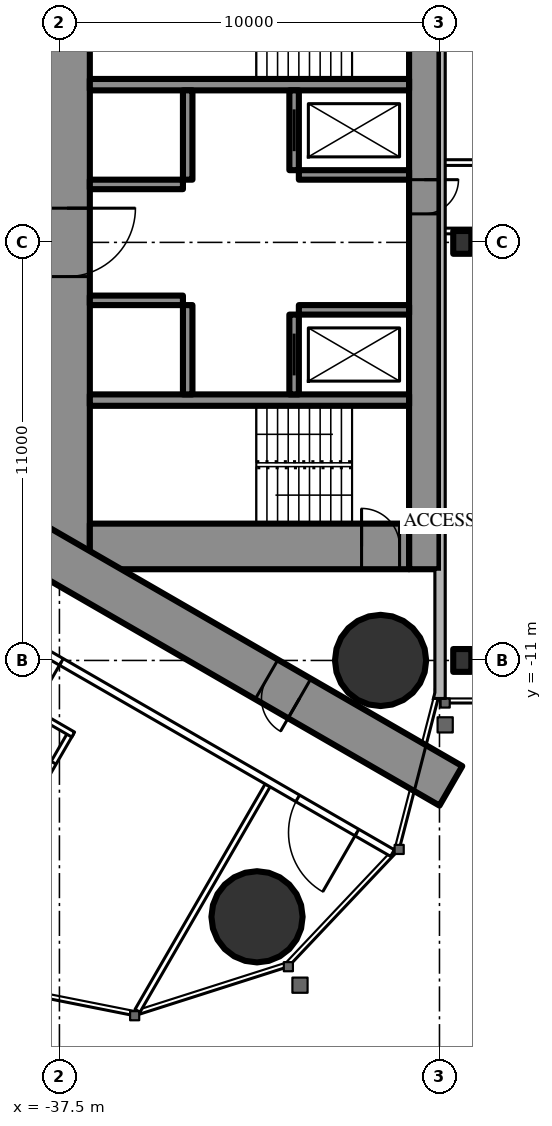
"""IFC4 building model, lengths in metres.
Left out: names, types, materials, properties, quantities, classifications, styles, units other than length and angle.
Written with IfcOpenShell. Run it as: python <this file> out.ifc"""

import sys

from ifc_helpers import new_model, si_unit, direction, frame, frame_2d, origin, origin_2d, place, context, subcontext, project, spatial, rectangle, circle, i_section, extrude, element, fill, save


model = new_model("IFC4")
c1 = context("Model", 3, precision=1e-05, world=origin(), true_north=direction((0.0, 1.0)))
c2 = subcontext(c1, "Body", "Model", "MODEL_VIEW")
j1 = project(units=[si_unit("LENGTHUNIT", "METRE"), si_unit("PLANEANGLEUNIT", "RADIAN")], contexts=[c1])
p1 = place(None, origin())
s1 = spatial("IfcSite", under=j1, at=p1, CompositionType="ELEMENT")
p2 = place(p1, origin())
s2 = spatial("IfcBuilding", under=s1, at=p2, CompositionType="ELEMENT")
p3 = place(p2, frame((0.0, 0.0, 229.7)))
s3 = spatial("IfcBuildingStorey", under=s2, at=p3, CompositionType="ELEMENT", Elevation=229.7)
for number, where, z_axis, x_axis in (
    (1, (-32.301, -17.745, 0.0), (0.0, 0.0, 1.0), (1.0, 0.0, 0.0)),
    (2, (-29.05, -11.0, 0.0), (0.0, 0.0, 1.0), (1.0, 0.0, 0.0)),
):
    element("IfcColumn", number, at=place(p3, frame(where, z_axis=z_axis, x_axis=x_axis)), inside=s3, PredefinedType="COLUMN", context=c2, shape_type="SweptSolid", body=[
        extrude(circle(Radius=1.2, at=origin_2d()), origin(), (0.0, 0.0, 1.0), 3.6),
    ])
p4 = place(p3, frame((-27.9, 8.6, 0.0), z_axis=(0.0, 0.0, 1.0), x_axis=(0.0, -1.0, 0.0)))
e3 = element("IfcWall", 3, at=p4, inside=s3, PredefinedType="SHEAR", context=c2, shape_type="SweptSolid", body=[
    extrude(rectangle(XDim=17.2, YDim=0.8, at=frame_2d((8.6, 0.0))), origin(), (0.0, 0.0, 1.0), 3.6),
])
p5 = place(p4, frame((6.95, 0.0, 0.0)))
e4 = element("IfcOpeningElement", 4, at=p5, cuts=e3, PredefinedType="OPENING", context=c2, shape_type="SweptSolid", body=[
    extrude(rectangle(XDim=0.9, YDim=2.2, at=frame_2d((0.45, 1.1))), frame((0.0, 0.41, 0.0), z_axis=(0.0, -1.0, 0.0), x_axis=(1.0, 0.0, 0.0)), (0.0, 0.0, 1.0), 0.82),
])
p6 = place(p3, frame((-37.3, 8.6, 0.0), z_axis=(0.0, 0.0, 1.0), x_axis=(0.0, -1.0, 0.0)))
e5 = element("IfcWall", 5, at=p6, inside=s3, PredefinedType="SHEAR", context=c2, shape_type="SweptSolid", body=[
    extrude(rectangle(XDim=17.2, YDim=1.2, at=frame_2d((8.6, 0.0))), origin(), (0.0, 0.0, 1.0), 3.6),
])
p7 = place(p6, frame((7.7, 0.0, 0.0)))
e6 = element("IfcOpeningElement", 6, at=p7, cuts=e5, PredefinedType="OPENING", context=c2, shape_type="SweptSolid", body=[
    extrude(rectangle(XDim=1.8, YDim=2.2, at=frame_2d((0.9, 1.1))), frame((0.0, 0.61, 0.0), z_axis=(0.0, -1.0, 0.0), x_axis=(1.0, 0.0, 0.0)), (0.0, 0.0, 1.0), 1.22),
])
p8 = place(p3, frame((-28.3, -8.0, 0.0), z_axis=(0.0, 0.0, 1.0), x_axis=(-1.0, 0.0, 0.0)))
e7 = element("IfcWall", 7, at=p8, inside=s3, PredefinedType="SHEAR", context=c2, shape_type="SweptSolid", body=[
    extrude(rectangle(XDim=8.4, YDim=1.2, at=frame_2d((4.2, 0.0))), origin(), (0.0, 0.0, 1.0), 3.6),
])
p9 = place(p8, frame((0.25, 0.0, 0.0)))
e8 = element("IfcOpeningElement", 8, at=p9, cuts=e7, PredefinedType="OPENING", context=c2, shape_type="SweptSolid", body=[
    extrude(rectangle(XDim=1.0, YDim=2.2, at=frame_2d((0.5, 1.1))), frame((0.0, 0.61, 0.0), z_axis=(0.0, -1.0, 0.0), x_axis=(1.0, 0.0, 0.0)), (0.0, 0.0, 1.0), 1.22),
])
for number, where, z_axis, x_axis in (
    (9, (-28.3, 4.15, 0.0), (0.0, 0.0, 1.0), (-1.0, 0.0, 0.0)),
    (10, (-28.3, -4.15, 0.0), (0.0, 0.0, 1.0), (-1.0, 0.0, 0.0)),
):
    element("IfcWall", number, at=place(p3, frame(where, z_axis=z_axis, x_axis=x_axis)), inside=s3, PredefinedType="SHEAR", context=c2, shape_type="SweptSolid", body=[
        extrude(rectangle(XDim=8.4, YDim=0.3, at=frame_2d((4.2, 0.0))), origin(), (0.0, 0.0, 1.0), 3.6),
    ])
p10 = place(p3, frame((-31.325, 4.0, 0.0), z_axis=(0.0, 0.0, 1.0), x_axis=(0.0, -1.0, 0.0)))
e11 = element("IfcWall", 11, at=p10, inside=s3, PredefinedType="SHEAR", context=c2, shape_type="SweptSolid", body=[
    extrude(rectangle(XDim=2.1, YDim=0.25, at=frame_2d((1.05, 0.0))), origin(), (0.0, 0.0, 1.0), 3.6),
])
p11 = place(p10, frame((0.5, 0.0, 0.0)))
e12 = element("IfcOpeningElement", 12, at=p11, cuts=e11, PredefinedType="OPENING", context=c2, shape_type="SweptSolid", body=[
    extrude(rectangle(XDim=1.1, YDim=2.2, at=frame_2d((0.55, 1.1))), frame((0.0, 0.135, 0.0), z_axis=(0.0, -1.0, 0.0), x_axis=(1.0, 0.0, 0.0)), (0.0, 0.0, 1.0), 0.27),
])
p12 = place(p3, frame((-34.125, 4.0, 0.0), z_axis=(0.0, 0.0, 1.0), x_axis=(0.0, -1.0, 0.0)))
e13 = element("IfcWall", 13, at=p12, inside=s3, PredefinedType="SHEAR", context=c2, shape_type="SweptSolid", body=[
    extrude(rectangle(XDim=2.35, YDim=0.25, at=frame_2d((1.175, 0.0))), origin(), (0.0, 0.0, 1.0), 3.6),
])
p13 = place(p3, frame((-28.3, 1.775, 0.0), z_axis=(0.0, 0.0, 1.0), x_axis=(-1.0, 0.0, 0.0)))
e14 = element("IfcWall", 14, at=p13, inside=s3, PredefinedType="SHEAR", context=c2, shape_type="SweptSolid", body=[
    extrude(rectangle(XDim=2.9, YDim=0.25, at=frame_2d((1.45, 0.0))), origin(), (0.0, 0.0, 1.0), 3.6),
])
p14 = place(p3, frame((-34.25, 1.525, 0.0), z_axis=(0.0, 0.0, 1.0), x_axis=(-1.0, 0.0, 0.0)))
e15 = element("IfcWall", 15, at=p14, inside=s3, PredefinedType="SHEAR", context=c2, shape_type="SweptSolid", body=[
    extrude(rectangle(XDim=2.45, YDim=0.25, at=frame_2d((1.225, 0.0))), origin(), (0.0, 0.0, 1.0), 3.6),
])
p15 = place(p3, frame((-31.325, -1.9, 0.0), z_axis=(0.0, 0.0, 1.0), x_axis=(0.0, -1.0, 0.0)))
e16 = element("IfcWall", 16, at=p15, inside=s3, PredefinedType="SHEAR", context=c2, shape_type="SweptSolid", body=[
    extrude(rectangle(XDim=2.1, YDim=0.25, at=frame_2d((1.05, 0.0))), origin(), (0.0, 0.0, 1.0), 3.6),
])
p16 = place(p15, frame((0.5, 0.0, 0.0)))
e17 = element("IfcOpeningElement", 17, at=p16, cuts=e16, PredefinedType="OPENING", context=c2, shape_type="SweptSolid", body=[
    extrude(rectangle(XDim=1.1, YDim=2.2, at=frame_2d((0.55, 1.1))), frame((0.0, 0.135, 0.0), z_axis=(0.0, -1.0, 0.0), x_axis=(1.0, 0.0, 0.0)), (0.0, 0.0, 1.0), 0.27),
])
p17 = place(p3, frame((-34.125, -1.65, 0.0), z_axis=(0.0, 0.0, 1.0), x_axis=(0.0, -1.0, 0.0)))
e18 = element("IfcWall", 18, at=p17, inside=s3, PredefinedType="SHEAR", context=c2, shape_type="SweptSolid", body=[
    extrude(rectangle(XDim=2.35, YDim=0.25, at=frame_2d((1.175, 0.0))), origin(), (0.0, 0.0, 1.0), 3.6),
])
p18 = place(p3, frame((-28.3, -1.775, 0.0), z_axis=(0.0, 0.0, 1.0), x_axis=(-1.0, 0.0, 0.0)))
e19 = element("IfcWall", 19, at=p18, inside=s3, PredefinedType="SHEAR", context=c2, shape_type="SweptSolid", body=[
    extrude(rectangle(XDim=2.9, YDim=0.25, at=frame_2d((1.45, 0.0))), origin(), (0.0, 0.0, 1.0), 3.6),
])
p19 = place(p3, frame((-34.25, -1.525, 0.0), z_axis=(0.0, 0.0, 1.0), x_axis=(-1.0, 0.0, 0.0)))
e20 = element("IfcWall", 20, at=p19, inside=s3, PredefinedType="SHEAR", context=c2, shape_type="SweptSolid", body=[
    extrude(rectangle(XDim=2.45, YDim=0.25, at=frame_2d((1.225, 0.0))), origin(), (0.0, 0.0, 1.0), 3.6),
])
p20 = place(p3, frame((-27.2, 14.3, 0.0), z_axis=(0.0, 0.0, 1.0), x_axis=(-0.866026593062, -0.499997940104, 0.0)))
e21 = element("IfcWall", 21, at=p20, inside=s3, PredefinedType="SHEAR", context=c2, shape_type="SweptSolid", body=[
    extrude(rectangle(XDim=28.946, YDim=1.2, at=frame_2d((14.473, 0.0))), origin(), (0.0, 0.0, 1.0), 3.6),
])
p21 = place(p20, frame((4.6, 0.0, 0.0)))
e22 = element("IfcOpeningElement", 22, at=p21, cuts=e21, PredefinedType="OPENING", context=c2, shape_type="SweptSolid", body=[
    extrude(rectangle(XDim=1.0, YDim=2.2, at=frame_2d((0.5, 1.1))), frame((0.0, 0.61, 0.0), z_axis=(0.0, -1.0, 0.0), x_axis=(1.0, 0.0, 0.0)), (0.0, 0.0, 1.0), 1.22),
])
p22 = place(p20, frame((13.395, 0.0, 0.0)))
e23 = element("IfcOpeningElement", 23, at=p22, cuts=e21, PredefinedType="OPENING", context=c2, shape_type="SweptSolid", body=[
    extrude(rectangle(XDim=1.8, YDim=2.2, at=frame_2d((0.9, 1.1))), frame((0.0, 0.61, 0.0), z_axis=(0.0, -1.0, 0.0), x_axis=(1.0, 0.0, 0.0)), (0.0, 0.0, 1.0), 1.22),
])
p23 = place(p3, frame((-27.2, -14.3, 0.0), z_axis=(0.0, 0.0, 1.0), x_axis=(-0.866024021859, 0.500002393557, 0.0)))
e24 = element("IfcWall", 24, at=p23, inside=s3, PredefinedType="SHEAR", context=c2, shape_type="SweptSolid", body=[
    extrude(rectangle(XDim=27.907, YDim=1.2, at=frame_2d((13.954, 0.0))), origin(), (0.0, 0.0, 1.0), 3.6),
])
p24 = place(p23, frame((4.6, 0.0, 0.0)))
e25 = element("IfcOpeningElement", 25, at=p24, cuts=e24, PredefinedType="OPENING", context=c2, shape_type="SweptSolid", body=[
    extrude(rectangle(XDim=1.0, YDim=2.2, at=frame_2d((0.5, 1.1))), frame((0.0, 0.61, 0.0), z_axis=(0.0, -1.0, 0.0), x_axis=(1.0, 0.0, 0.0)), (0.0, 0.0, 1.0), 1.22),
])
p25 = place(p23, frame((13.395, 0.0, 0.0)))
e26 = element("IfcOpeningElement", 26, at=p25, cuts=e24, PredefinedType="OPENING", context=c2, shape_type="SweptSolid", body=[
    extrude(rectangle(XDim=1.8, YDim=2.2, at=frame_2d((0.9, 1.1))), frame((0.0, 0.61, 0.0), z_axis=(0.0, -1.0, 0.0), x_axis=(1.0, 0.0, 0.0)), (0.0, 0.0, 1.0), 1.22),
])
for number, where, z_axis, x_axis in (
    (27, (-26.9, -11.0, 0.0), (0.0, 0.0, 1.0), (1.0, 0.0, 0.0)),
    (28, (-26.9, 0.0, 0.0), (0.0, 0.0, 1.0), (1.0, 0.0, 0.0)),
):
    element("IfcColumn", number, at=place(p3, frame(where, z_axis=z_axis, x_axis=x_axis)), inside=s3, PredefinedType="COLUMN", context=c2, shape_type="SweptSolid", body=[
        extrude(i_section(OverallWidth=0.476, OverallDepth=0.6, WebThickness=0.1, FlangeThickness=0.14, FilletRadius=0.02, at=origin_2d()), origin(), (0.0, 0.0, 1.0), 3.6),
    ])
p26 = place(p3, frame((-32.022, -14.287, 0.0), z_axis=(0.0, 0.0, 1.0), x_axis=(-0.50000019414, -0.866025291697, 0.0)))
e29 = element("IfcWall", 29, at=p26, inside=s3, PredefinedType="PARTITIONING", context=c2, shape_type="SweptSolid", body=[
    extrude(rectangle(XDim=6.848, YDim=0.15, at=frame_2d((3.424, 0.0))), origin(), (0.0, 0.0, 1.0), 3.35),
])
p27 = place(p3, frame((-28.737, -16.068, 0.0), z_axis=(0.0, 0.0, 1.0), x_axis=(-0.866029399323, 0.49999307946, 0.0)))
e30 = element("IfcWall", 30, at=p27, inside=s3, PredefinedType="PARTITIONING", context=c2, shape_type="SweptSolid", body=[
    extrude(rectangle(XDim=11.61, YDim=0.2, at=frame_2d((5.805, 0.0))), origin(), (0.0, 0.0, 1.0), 3.35),
])
p28 = place(p27, frame((1.08, 0.0, 0.0)))
e31 = element("IfcOpeningElement", 31, at=p28, cuts=e30, PredefinedType="OPENING", context=c2, shape_type="SweptSolid", body=[
    extrude(rectangle(XDim=1.8, YDim=2.04, at=frame_2d((0.9, 1.02))), frame((0.0, 0.11, 0.0), z_axis=(0.0, -1.0, 0.0), x_axis=(1.0, 0.0, 0.0)), (0.0, 0.0, 1.0), 0.22),
])
p29 = place(p27, frame((10.06, 0.0, 0.0)))
e32 = element("IfcOpeningElement", 32, at=p29, cuts=e30, PredefinedType="OPENING", context=c2, shape_type="SweptSolid", body=[
    extrude(rectangle(XDim=0.95, YDim=2.2, at=frame_2d((0.475, 1.1))), frame((0.0, 0.11, 0.0), z_axis=(0.0, -1.0, 0.0), x_axis=(1.0, 0.0, 0.0)), (0.0, 0.0, 1.0), 0.22),
])
p30 = place(p3, frame((-37.203, -12.913, 0.0), z_axis=(0.0, 0.0, 1.0), x_axis=(-0.500006934395, -0.866021400173, 0.0)))
e33 = element("IfcWall", 33, at=p30, inside=s3, PredefinedType="PARTITIONING", context=c2, shape_type="SweptSolid", body=[
    extrude(rectangle(XDim=2.6, YDim=0.15, at=frame_2d((1.3, 0.0))), origin(), (0.0, 0.0, 1.0), 3.35),
])
p31 = place(p30, frame((0.9, 0.0, 0.0)))
e34 = element("IfcOpeningElement", 34, at=p31, cuts=e33, PredefinedType="OPENING", context=c2, shape_type="SweptSolid", body=[
    extrude(rectangle(XDim=0.8, YDim=2.2, at=frame_2d((0.4, 1.1))), frame((0.0, 0.085, 0.0), z_axis=(0.0, -1.0, 0.0), x_axis=(1.0, 0.0, 0.0)), (0.0, 0.0, 1.0), 0.17),
])
p32 = place(p3, frame((-37.138, -12.95, 0.0), z_axis=(0.0, 0.0, 1.0), x_axis=(-0.866031185235, 0.4999899861, 0.0)))
e35 = element("IfcWall", 35, at=p32, inside=s3, PredefinedType="PARTITIONING", context=c2, shape_type="SweptSolid", body=[
    extrude(rectangle(XDim=2.475, YDim=0.15, at=frame_2d((1.238, 0.0))), origin(), (0.0, 0.0, 1.0), 2.5),
])
p33 = place(p3, frame((-27.5, 0.3, 0.0), z_axis=(0.0, 0.0, 1.0), x_axis=(1.0, 0.0, 0.0)))
e36 = element("IfcWall", 36, at=p33, inside=s3, PredefinedType="PARTITIONING", context=c2, shape_type="SweptSolid", body=[
    extrude(rectangle(XDim=55.0, YDim=0.15, at=frame_2d((27.5, 0.0))), origin(), (0.0, 0.0, 1.0), 2.4),
])
p34 = place(p33, frame((1.575, 0.0, 0.0)))
e37 = element("IfcOpeningElement", 37, at=p34, cuts=e36, PredefinedType="OPENING", context=c2, shape_type="SweptSolid", body=[
    extrude(rectangle(XDim=1.0, YDim=2.2, at=frame_2d((0.5, 1.1))), frame((0.0, 0.085, 0.0), z_axis=(0.0, -1.0, 0.0), x_axis=(1.0, 0.0, 0.0)), (0.0, 0.0, 1.0), 0.17),
])
p35 = place(p33, frame((7.525, 0.0, 0.0)))
e38 = element("IfcOpeningElement", 38, at=p35, cuts=e36, PredefinedType="OPENING", context=c2, shape_type="SweptSolid", body=[
    extrude(rectangle(XDim=1.05, YDim=2.4, at=frame_2d((0.525, 1.2))), frame((0.0, 0.085, 0.0), z_axis=(0.0, -1.0, 0.0), x_axis=(1.0, 0.0, 0.0)), (0.0, 0.0, 1.0), 0.17),
])
p36 = place(p33, frame((18.525, 0.0, 0.0)))
e39 = element("IfcOpeningElement", 39, at=p36, cuts=e36, PredefinedType="OPENING", context=c2, shape_type="SweptSolid", body=[
    extrude(rectangle(XDim=1.05, YDim=2.4, at=frame_2d((0.525, 1.2))), frame((0.0, 0.085, 0.0), z_axis=(0.0, -1.0, 0.0), x_axis=(1.0, 0.0, 0.0)), (0.0, 0.0, 1.0), 0.17),
])
p37 = place(p33, frame((24.025, 0.0, 0.0)))
e40 = element("IfcOpeningElement", 40, at=p37, cuts=e36, PredefinedType="OPENING", context=c2, shape_type="SweptSolid", body=[
    extrude(rectangle(XDim=1.05, YDim=2.4, at=frame_2d((0.525, 1.2))), frame((0.0, 0.085, 0.0), z_axis=(0.0, -1.0, 0.0), x_axis=(1.0, 0.0, 0.0)), (0.0, 0.0, 1.0), 0.17),
])
p38 = place(p33, frame((35.025, 0.0, 0.0)))
e41 = element("IfcOpeningElement", 41, at=p38, cuts=e36, PredefinedType="OPENING", context=c2, shape_type="SweptSolid", body=[
    extrude(rectangle(XDim=1.05, YDim=2.4, at=frame_2d((0.525, 1.2))), frame((0.0, 0.085, 0.0), z_axis=(0.0, -1.0, 0.0), x_axis=(1.0, 0.0, 0.0)), (0.0, 0.0, 1.0), 0.17),
])
p39 = place(p33, frame((40.525, 0.0, 0.0)))
e42 = element("IfcOpeningElement", 42, at=p39, cuts=e36, PredefinedType="OPENING", context=c2, shape_type="SweptSolid", body=[
    extrude(rectangle(XDim=1.05, YDim=2.4, at=frame_2d((0.525, 1.2))), frame((0.0, 0.085, 0.0), z_axis=(0.0, -1.0, 0.0), x_axis=(1.0, 0.0, 0.0)), (0.0, 0.0, 1.0), 0.17),
])
p40 = place(p33, frame((52.525, 0.0, 0.0)))
e43 = element("IfcOpeningElement", 43, at=p40, cuts=e36, PredefinedType="OPENING", context=c2, shape_type="SweptSolid", body=[
    extrude(rectangle(XDim=1.05, YDim=2.4, at=frame_2d((0.525, 1.2))), frame((0.0, 0.085, 0.0), z_axis=(0.0, -1.0, 0.0), x_axis=(1.0, 0.0, 0.0)), (0.0, 0.0, 1.0), 0.17),
])
p41 = place(p3, frame((-27.5, 2.1, 0.0), z_axis=(0.0, 0.0, 1.0), x_axis=(1.0, 0.0, 0.0)))
e44 = element("IfcWall", 44, at=p41, inside=s3, PredefinedType="PARTITIONING", context=c2, shape_type="SweptSolid", body=[
    extrude(rectangle(XDim=22.35, YDim=0.15, at=frame_2d((11.175, 0.0))), origin(), (0.0, 0.0, 1.0), 3.4),
])
p42 = place(p41, frame((2.025, 0.0, 0.0)))
e45 = element("IfcOpeningElement", 45, at=p42, cuts=e44, PredefinedType="OPENING", context=c2, shape_type="SweptSolid", body=[
    extrude(rectangle(XDim=1.05, YDim=2.4, at=frame_2d((0.525, 1.2))), frame((0.0, 0.085, 0.0), z_axis=(0.0, -1.0, 0.0), x_axis=(1.0, 0.0, 0.0)), (0.0, 0.0, 1.0), 0.17),
])
p43 = place(p41, frame((7.525, 0.0, 0.0)))
e46 = element("IfcOpeningElement", 46, at=p43, cuts=e44, PredefinedType="OPENING", context=c2, shape_type="SweptSolid", body=[
    extrude(rectangle(XDim=1.05, YDim=2.4, at=frame_2d((0.525, 1.2))), frame((0.0, 0.085, 0.0), z_axis=(0.0, -1.0, 0.0), x_axis=(1.0, 0.0, 0.0)), (0.0, 0.0, 1.0), 0.17),
])
p44 = place(p41, frame((13.025, 0.0, 0.0)))
e47 = element("IfcOpeningElement", 47, at=p44, cuts=e44, PredefinedType="OPENING", context=c2, shape_type="SweptSolid", body=[
    extrude(rectangle(XDim=1.05, YDim=2.4, at=frame_2d((0.525, 1.2))), frame((0.0, 0.085, 0.0), z_axis=(0.0, -1.0, 0.0), x_axis=(1.0, 0.0, 0.0)), (0.0, 0.0, 1.0), 0.17),
])
p45 = place(p41, frame((18.525, 0.0, 0.0)))
e48 = element("IfcOpeningElement", 48, at=p45, cuts=e44, PredefinedType="OPENING", context=c2, shape_type="SweptSolid", body=[
    extrude(rectangle(XDim=1.05, YDim=2.4, at=frame_2d((0.525, 1.2))), frame((0.0, 0.085, 0.0), z_axis=(0.0, -1.0, 0.0), x_axis=(1.0, 0.0, 0.0)), (0.0, 0.0, 1.0), 0.17),
])
p46 = place(p28, origin())
e49 = element("IfcDoor", 49, at=p46, inside=s3, OperationType="DOUBLE_DOOR_SINGLE_SWING", PredefinedType="DOOR", context=c2, shape_type="SweptSolid", body=[
    extrude(rectangle(XDim=1.8, YDim=2.04, at=frame_2d((0.9, 1.02))), frame((0.0, 0.025, 0.0), z_axis=(0.0, -1.0, 0.0), x_axis=(1.0, 0.0, 0.0)), (0.0, 0.0, 1.0), 0.05),
])
fill(e31, e49)
p47 = place(p31, origin())
e50 = element("IfcDoor", 50, at=p47, inside=s3, OperationType="SINGLE_SWING_RIGHT", PredefinedType="DOOR", context=c2, shape_type="SweptSolid", body=[
    extrude(rectangle(XDim=0.8, YDim=2.2, at=frame_2d((0.4, 1.1))), frame((0.0, 0.025, 0.0), z_axis=(0.0, -1.0, 0.0), x_axis=(1.0, 0.0, 0.0)), (0.0, 0.0, 1.0), 0.05),
])
fill(e34, e50)
p48 = place(p29, origin())
e51 = element("IfcDoor", 51, at=p48, inside=s3, OperationType="SINGLE_SWING_LEFT", PredefinedType="DOOR", context=c2, shape_type="SweptSolid", body=[
    extrude(rectangle(XDim=0.95, YDim=2.2, at=frame_2d((0.475, 1.1))), frame((0.0, 0.025, 0.0), z_axis=(0.0, -1.0, 0.0), x_axis=(1.0, 0.0, 0.0)), (0.0, 0.0, 1.0), 0.05),
])
fill(e32, e51)
p49 = place(p24, origin())
e52 = element("IfcDoor", 52, at=p49, inside=s3, OperationType="SINGLE_SWING_LEFT", PredefinedType="DOOR", context=c2, shape_type="SweptSolid", body=[
    extrude(rectangle(XDim=1.0, YDim=2.2, at=frame_2d((0.5, 1.1))), frame((0.0, 0.025, 0.0), z_axis=(0.0, -1.0, 0.0), x_axis=(1.0, 0.0, 0.0)), (0.0, 0.0, 1.0), 0.05),
])
fill(e25, e52)
p50 = place(p7, origin())
e53 = element("IfcDoor", 53, at=p50, inside=s3, OperationType="DOUBLE_DOOR_SINGLE_SWING", PredefinedType="DOOR", context=c2, shape_type="SweptSolid", body=[
    extrude(rectangle(XDim=1.8, YDim=2.2, at=frame_2d((0.9, 1.1))), frame((0.0, 0.025, 0.0), z_axis=(0.0, -1.0, 0.0), x_axis=(1.0, 0.0, 0.0)), (0.0, 0.0, 1.0), 0.05),
])
fill(e6, e53)
p51 = place(p9, origin())
e54 = element("IfcDoor", 54, at=p51, inside=s3, OperationType="SINGLE_SWING_RIGHT", PredefinedType="DOOR", context=c2, shape_type="SweptSolid", body=[
    extrude(rectangle(XDim=1.0, YDim=2.2, at=frame_2d((0.5, 1.1))), frame((0.0, 0.025, 0.0), z_axis=(0.0, -1.0, 0.0), x_axis=(1.0, 0.0, 0.0)), (0.0, 0.0, 1.0), 0.05),
])
fill(e8, e54)
p52 = place(p5, origin())
e55 = element("IfcDoor", 55, at=p52, inside=s3, OperationType="SINGLE_SWING_LEFT", PredefinedType="DOOR", context=c2, shape_type="SweptSolid", body=[
    extrude(rectangle(XDim=0.9, YDim=2.2, at=frame_2d((0.45, 1.1))), frame((0.0, 0.025, 0.0), z_axis=(0.0, -1.0, 0.0), x_axis=(1.0, 0.0, 0.0)), (0.0, 0.0, 1.0), 0.05),
])
fill(e4, e55)
p53 = place(p11, origin())
e56 = element("IfcDoor", 56, at=p53, inside=s3, OperationType="SLIDING_TO_LEFT", PredefinedType="USERDEFINED", context=c2, shape_type="SweptSolid", body=[
    extrude(rectangle(XDim=1.1, YDim=2.2, at=frame_2d((0.55, 1.1))), frame((0.0, 0.025, 0.0), z_axis=(0.0, -1.0, 0.0), x_axis=(1.0, 0.0, 0.0)), (0.0, 0.0, 1.0), 0.05),
])
fill(e12, e56)
p54 = place(p16, origin())
e57 = element("IfcDoor", 57, at=p54, inside=s3, OperationType="SLIDING_TO_LEFT", PredefinedType="USERDEFINED", context=c2, shape_type="SweptSolid", body=[
    extrude(rectangle(XDim=1.1, YDim=2.2, at=frame_2d((0.55, 1.1))), frame((0.0, 0.025, 0.0), z_axis=(0.0, -1.0, 0.0), x_axis=(1.0, 0.0, 0.0)), (0.0, 0.0, 1.0), 0.05),
])
fill(e17, e57)
save(model, sys.argv[1])
